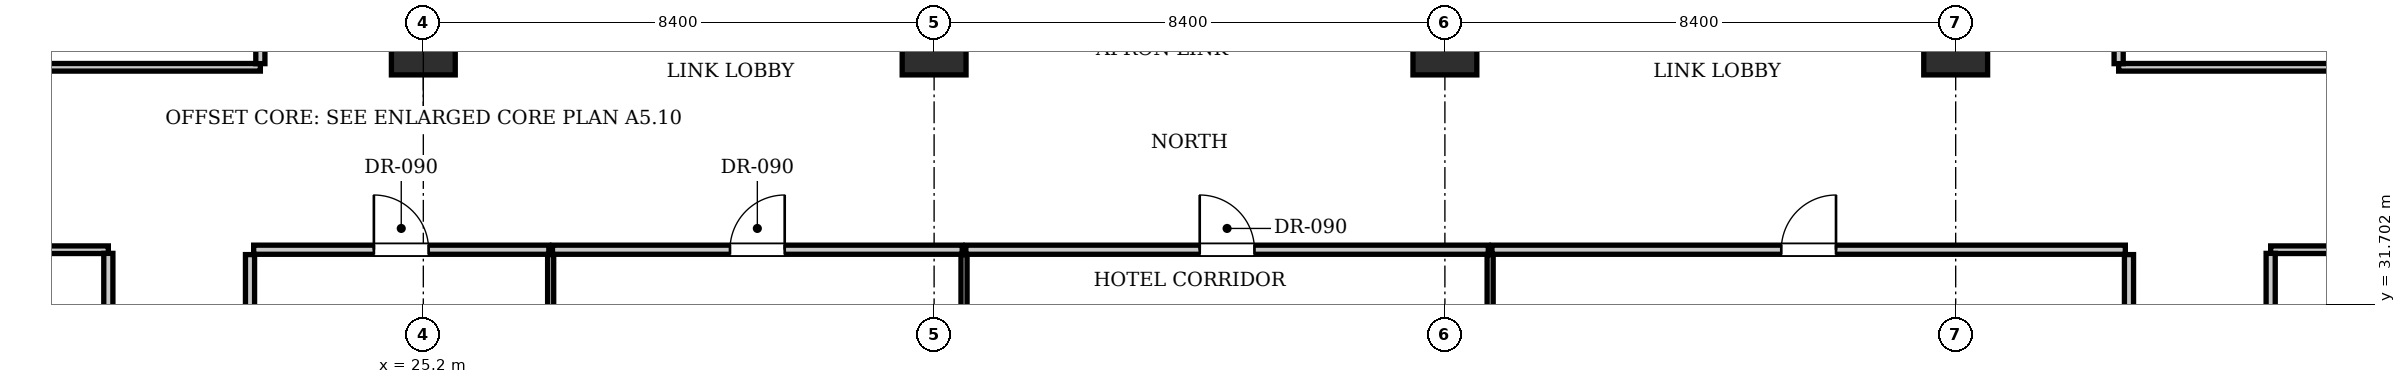
"""IFC4 building model, lengths in metres.
Left out: names, types, materials, properties, quantities, classifications, styles, units other than length and angle.
Written with IfcOpenShell. Run it as: python <this file> out.ifc"""

import sys

from ifc_helpers import new_model, si_unit, direction, frame, frame_2d, origin, origin_2d, place, context, subcontext, project, spatial, rectangle, extrude, element, fill, save


model = new_model("IFC4")
c1 = context("Model", 3, precision=1e-05, world=origin(), true_north=direction((0.0, 1.0)))
c2 = subcontext(c1, "Body", "Model", "MODEL_VIEW")
j1 = project(units=[si_unit("LENGTHUNIT", "METRE"), si_unit("PLANEANGLEUNIT", "RADIAN")], contexts=[c1])
p1 = place(None, origin())
s1 = spatial("IfcSite", under=j1, at=p1, CompositionType="ELEMENT")
p2 = place(p1, origin())
s2 = spatial("IfcBuilding", under=s1, at=p2, CompositionType="ELEMENT")
p3 = place(p2, frame((0.0, 0.0, 69.3)))
s3 = spatial("IfcBuildingStorey", under=s2, at=p3, CompositionType="ELEMENT", Elevation=69.3)
for number, where, z_axis, x_axis in (
    (1, (25.2, 36.0, 0.0), (0.0, 0.0, 1.0), (1.0, 0.0, 0.0)),
    (2, (33.6, 36.0, 0.0), (0.0, 0.0, 1.0), (1.0, 0.0, 0.0)),
    (3, (42.0, 36.0, 0.0), (0.0, 0.0, 1.0), (1.0, 0.0, 0.0)),
    (4, (50.4, 36.0, 0.0), (0.0, 0.0, 1.0), (1.0, 0.0, 0.0)),
):
    element("IfcColumn", number, at=place(p3, frame(where, z_axis=z_axis, x_axis=x_axis)), inside=s3, PredefinedType="COLUMN", context=c2, shape_type="SweptSolid", body=[
        extrude(rectangle(XDim=1.05, YDim=1.05, at=origin_2d()), origin(), (0.0, 0.0, 1.0), 3.85),
    ])
for number, where, z_axis, x_axis in (
    (5, (22.35, 24.19, 0.0), (0.0, 0.0, 1.0), (0.0, 1.0, 0.0)),
    (6, (53.25, 24.19, 0.0), (0.0, 0.0, 1.0), (0.0, 1.0, 0.0)),
):
    element("IfcWall", number, at=place(p3, frame(where, z_axis=z_axis, x_axis=x_axis)), inside=s3, PredefinedType="PARTITIONING", context=c2, shape_type="SweptSolid", body=[
        extrude(rectangle(XDim=8.33, YDim=0.15, at=frame_2d((4.165, 0.0))), origin(), (0.0, 0.0, 1.0), 3.61),
    ])
p4 = place(p3, frame((22.41, 32.6, 0.0), z_axis=(0.0, 0.0, 1.0), x_axis=(1.0, 0.0, 0.0)))
e7 = element("IfcWall", 7, at=p4, inside=s3, PredefinedType="PARTITIONING", context=c2, shape_type="SweptSolid", body=[
    extrude(rectangle(XDim=4.854, YDim=0.15, at=frame_2d((2.427, 0.0))), origin(), (0.0, 0.0, 1.0), 3.61),
])
p5 = place(p4, frame((1.977, 0.0, 0.0)))
e8 = element("IfcOpeningElement", 8, at=p5, cuts=e7, PredefinedType="OPENING", context=c2, shape_type="SweptSolid", body=[
    extrude(rectangle(XDim=0.9, YDim=2.1, at=frame_2d((0.45, 1.05))), frame((0.0, 0.085, 0.0), z_axis=(0.0, -1.0, 0.0), x_axis=(1.0, 0.0, 0.0)), (0.0, 0.0, 1.0), 0.17),
])
p6 = place(p3, frame((27.294, 24.19, 0.0), z_axis=(0.0, 0.0, 1.0), x_axis=(0.0, 1.0, 0.0)))
e9 = element("IfcWall", 9, at=p6, inside=s3, PredefinedType="PARTITIONING", context=c2, shape_type="SweptSolid", body=[
    extrude(rectangle(XDim=8.33, YDim=0.1, at=frame_2d((4.165, 0.0))), origin(), (0.0, 0.0, 1.0), 3.61),
])
p7 = place(p3, frame((27.324, 32.6, 0.0), z_axis=(0.0, 0.0, 1.0), x_axis=(1.0, 0.0, 0.0)))
e10 = element("IfcWall", 10, at=p7, inside=s3, PredefinedType="PARTITIONING", context=c2, shape_type="SweptSolid", body=[
    extrude(rectangle(XDim=6.738, YDim=0.15, at=frame_2d((3.369, 0.0))), origin(), (0.0, 0.0, 1.0), 3.61),
])
p8 = place(p7, frame((2.919, 0.0, 0.0)))
e11 = element("IfcOpeningElement", 11, at=p8, cuts=e10, PredefinedType="OPENING", context=c2, shape_type="SweptSolid", body=[
    extrude(rectangle(XDim=0.9, YDim=2.1, at=frame_2d((0.45, 1.05))), frame((0.0, 0.085, 0.0), z_axis=(0.0, -1.0, 0.0), x_axis=(1.0, 0.0, 0.0)), (0.0, 0.0, 1.0), 0.17),
])
p9 = place(p3, frame((34.092, 24.19, 0.0), z_axis=(0.0, 0.0, 1.0), x_axis=(0.0, 1.0, 0.0)))
e12 = element("IfcWall", 12, at=p9, inside=s3, PredefinedType="PARTITIONING", context=c2, shape_type="SweptSolid", body=[
    extrude(rectangle(XDim=8.33, YDim=0.1, at=frame_2d((4.165, 0.0))), origin(), (0.0, 0.0, 1.0), 3.61),
])
p10 = place(p3, frame((34.122, 32.6, 0.0), z_axis=(0.0, 0.0, 1.0), x_axis=(1.0, 0.0, 0.0)))
e13 = element("IfcWall", 13, at=p10, inside=s3, PredefinedType="PARTITIONING", context=c2, shape_type="SweptSolid", body=[
    extrude(rectangle(XDim=8.592, YDim=0.15, at=frame_2d((4.296, 0.0))), origin(), (0.0, 0.0, 1.0), 3.61),
])
p11 = place(p10, frame((3.846, 0.0, 0.0)))
e14 = element("IfcOpeningElement", 14, at=p11, cuts=e13, PredefinedType="OPENING", context=c2, shape_type="SweptSolid", body=[
    extrude(rectangle(XDim=0.9, YDim=2.1, at=frame_2d((0.45, 1.05))), frame((0.0, 0.085, 0.0), z_axis=(0.0, -1.0, 0.0), x_axis=(1.0, 0.0, 0.0)), (0.0, 0.0, 1.0), 0.17),
])
p12 = place(p3, frame((42.744, 24.19, 0.0), z_axis=(0.0, 0.0, 1.0), x_axis=(0.0, 1.0, 0.0)))
e15 = element("IfcWall", 15, at=p12, inside=s3, PredefinedType="PARTITIONING", context=c2, shape_type="SweptSolid", body=[
    extrude(rectangle(XDim=8.33, YDim=0.1, at=frame_2d((4.165, 0.0))), origin(), (0.0, 0.0, 1.0), 3.61),
])
p13 = place(p3, frame((42.774, 32.6, 0.0), z_axis=(0.0, 0.0, 1.0), x_axis=(1.0, 0.0, 0.0)))
e16 = element("IfcWall", 16, at=p13, inside=s3, PredefinedType="PARTITIONING", context=c2, shape_type="SweptSolid", body=[
    extrude(rectangle(XDim=10.416, YDim=0.15, at=frame_2d((5.208, 0.0))), origin(), (0.0, 0.0, 1.0), 3.61),
])
p14 = place(p13, frame((4.758, 0.0, 0.0)))
e17 = element("IfcOpeningElement", 17, at=p14, cuts=e16, PredefinedType="OPENING", context=c2, shape_type="SweptSolid", body=[
    extrude(rectangle(XDim=0.9, YDim=2.1, at=frame_2d((0.45, 1.05))), frame((0.0, 0.085, 0.0), z_axis=(0.0, -1.0, 0.0), x_axis=(1.0, 0.0, 0.0)), (0.0, 0.0, 1.0), 0.17),
])
p15 = place(p3, frame((10.9, 32.6, 0.0), z_axis=(0.0, 0.0, 1.0), x_axis=(1.0, 0.0, 0.0)))
e18 = element("IfcWall", 18, at=p15, inside=s3, PredefinedType="PARTITIONING", context=c2, shape_type="SweptSolid", body=[
    extrude(rectangle(XDim=9.12, YDim=0.125, at=frame_2d((4.56, 0.0))), origin(), (0.0, 0.0, 1.0), 3.61),
])
p16 = place(p3, frame((55.58, 32.6, 0.0), z_axis=(0.0, 0.0, 1.0), x_axis=(1.0, 0.0, 0.0)))
e19 = element("IfcWall", 19, at=p16, inside=s3, PredefinedType="PARTITIONING", context=c2, shape_type="SweptSolid", body=[
    extrude(rectangle(XDim=9.12, YDim=0.125, at=frame_2d((4.56, 0.0))), origin(), (0.0, 0.0, 1.0), 3.61),
])
for number, where, z_axis, x_axis in (
    (20, (20.02, 30.25, 0.0), (0.0, 0.0, 1.0), (0.0, 1.0, 0.0)),
    (21, (55.58, 30.25, 0.0), (0.0, 0.0, 1.0), (0.0, 1.0, 0.0)),
):
    element("IfcWall", number, at=place(p3, frame(where, z_axis=z_axis, x_axis=x_axis)), inside=s3, PredefinedType="PARTITIONING", context=c2, shape_type="SweptSolid", body=[
        extrude(rectangle(XDim=2.29, YDim=0.15, at=frame_2d((1.145, 0.0))), origin(), (0.0, 0.0, 1.0), 3.61),
    ])
p17 = place(p3, frame((10.9, 35.6, 0.0), z_axis=(0.0, 0.0, 1.0), x_axis=(1.0, 0.0, 0.0)))
e22 = element("IfcWall", 22, at=p17, inside=s3, PredefinedType="PARTITIONING", context=c2, shape_type="SweptSolid", body=[
    extrude(rectangle(XDim=11.62, YDim=0.125, at=frame_2d((5.81, 0.0))), origin(), (0.0, 0.0, 1.0), 3.61),
])
p18 = place(p3, frame((53.08, 35.6, 0.0), z_axis=(0.0, 0.0, 1.0), x_axis=(1.0, 0.0, 0.0)))
e23 = element("IfcWall", 23, at=p18, inside=s3, PredefinedType="PARTITIONING", context=c2, shape_type="SweptSolid", body=[
    extrude(rectangle(XDim=11.62, YDim=0.125, at=frame_2d((5.81, 0.0))), origin(), (0.0, 0.0, 1.0), 3.61),
])
p19 = place(p3, frame((22.52, 35.66, 0.0), z_axis=(0.0, 0.0, 1.0), x_axis=(0.0, 1.0, 0.0)))
e24 = element("IfcWall", 24, at=p19, inside=s3, PredefinedType="PARTITIONING", context=c2, shape_type="SweptSolid", body=[
    extrude(rectangle(XDim=12.328, YDim=0.15, at=frame_2d((6.164, 0.0))), origin(), (0.0, 0.0, 1.0), 3.61),
])
p20 = place(p19, frame((5.689, 0.0, 0.0)))
e25 = element("IfcOpeningElement", 25, at=p20, cuts=e24, PredefinedType="OPENING", context=c2, shape_type="SweptSolid", body=[
    extrude(rectangle(XDim=0.95, YDim=2.15, at=frame_2d((0.475, 1.075))), frame((0.0, 0.085, 0.0), z_axis=(0.0, -1.0, 0.0), x_axis=(1.0, 0.0, 0.0)), (0.0, 0.0, 1.0), 0.17),
])
p21 = place(p3, frame((53.08, 35.66, 0.0), z_axis=(0.0, 0.0, 1.0), x_axis=(0.0, 1.0, 0.0)))
e26 = element("IfcWall", 26, at=p21, inside=s3, PredefinedType="PARTITIONING", context=c2, shape_type="SweptSolid", body=[
    extrude(rectangle(XDim=12.328, YDim=0.15, at=frame_2d((6.164, 0.0))), origin(), (0.0, 0.0, 1.0), 3.61),
])
p22 = place(p21, frame((5.689, 0.0, 0.0)))
e27 = element("IfcOpeningElement", 27, at=p22, cuts=e26, PredefinedType="OPENING", context=c2, shape_type="SweptSolid", body=[
    extrude(rectangle(XDim=0.95, YDim=2.15, at=frame_2d((0.475, 1.075))), frame((0.0, 0.085, 0.0), z_axis=(0.0, -1.0, 0.0), x_axis=(1.0, 0.0, 0.0)), (0.0, 0.0, 1.0), 0.17),
])
p23 = place(p5, origin())
e28 = element("IfcDoor", 28, at=p23, inside=s3, OperationType="SINGLE_SWING_LEFT", PredefinedType="DOOR", context=c2, shape_type="SweptSolid", body=[
    extrude(rectangle(XDim=0.9, YDim=2.1, at=frame_2d((0.45, 1.05))), frame((0.0, 0.025, 0.0), z_axis=(0.0, -1.0, 0.0), x_axis=(1.0, 0.0, 0.0)), (0.0, 0.0, 1.0), 0.05),
])
fill(e8, e28)
p24 = place(p8, origin())
e29 = element("IfcDoor", 29, at=p24, inside=s3, OperationType="SINGLE_SWING_RIGHT", PredefinedType="DOOR", context=c2, shape_type="SweptSolid", body=[
    extrude(rectangle(XDim=0.9, YDim=2.1, at=frame_2d((0.45, 1.05))), frame((0.0, 0.025, 0.0), z_axis=(0.0, -1.0, 0.0), x_axis=(1.0, 0.0, 0.0)), (0.0, 0.0, 1.0), 0.05),
])
fill(e11, e29)
p25 = place(p11, origin())
e30 = element("IfcDoor", 30, at=p25, inside=s3, OperationType="SINGLE_SWING_LEFT", PredefinedType="DOOR", context=c2, shape_type="SweptSolid", body=[
    extrude(rectangle(XDim=0.9, YDim=2.1, at=frame_2d((0.45, 1.05))), frame((0.0, 0.025, 0.0), z_axis=(0.0, -1.0, 0.0), x_axis=(1.0, 0.0, 0.0)), (0.0, 0.0, 1.0), 0.05),
])
fill(e14, e30)
p26 = place(p14, origin())
e31 = element("IfcDoor", 31, at=p26, inside=s3, OperationType="SINGLE_SWING_RIGHT", PredefinedType="DOOR", context=c2, shape_type="SweptSolid", body=[
    extrude(rectangle(XDim=0.9, YDim=2.1, at=frame_2d((0.45, 1.05))), frame((0.0, 0.025, 0.0), z_axis=(0.0, -1.0, 0.0), x_axis=(1.0, 0.0, 0.0)), (0.0, 0.0, 1.0), 0.05),
])
fill(e17, e31)
save(model, sys.argv[1])
